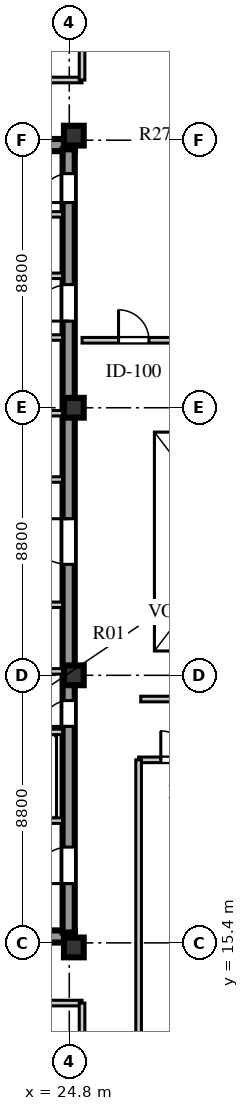
"""IFC4 building model, lengths in metres.
Left out: names, types, materials, properties, quantities, classifications, styles, units other than length and angle.
Written with IfcOpenShell. Run it as: python <this file> out.ifc"""

import sys

from ifc_helpers import new_model, si_unit, direction, frame, frame_2d, origin, origin_2d, place, context, subcontext, project, spatial, rectangle, extrude, element, fill, save


model = new_model("IFC4")
c1 = context("Model", 3, precision=1e-05, world=origin(), true_north=direction((0.0, 1.0)))
c2 = subcontext(c1, "Body", "Model", "MODEL_VIEW")
j1 = project(units=[si_unit("LENGTHUNIT", "METRE"), si_unit("PLANEANGLEUNIT", "RADIAN")], contexts=[c1])
p1 = place(None, origin())
s1 = spatial("IfcSite", under=j1, at=p1, CompositionType="ELEMENT")
p2 = place(p1, origin())
s2 = spatial("IfcBuilding", under=s1, at=p2, CompositionType="ELEMENT")
p3 = place(p2, frame((0.0, 0.0, 260.9)))
s3 = spatial("IfcBuildingStorey", under=s2, at=p3, CompositionType="ELEMENT", Elevation=260.9)
for number, where, z_axis, x_axis in (
    (1, (15.5, 15.61, 0.0), (0.0, 0.0, 1.0), (1.0, 0.0, 0.0)),
    (2, (15.5, 41.64, 0.0), (0.0, 0.0, 1.0), (1.0, 0.0, 0.0)),
):
    element("IfcWall", number, at=place(p3, frame(where, z_axis=z_axis, x_axis=x_axis)), inside=s3, PredefinedType="SHEAR", context=c2, shape_type="SweptSolid", body=[
        extrude(rectangle(XDim=9.48, YDim=0.4, at=frame_2d((4.74, 0.0))), origin(), (0.0, 0.0, 1.0), 3.66),
    ])
p4 = place(p3, frame((24.78, 15.74, 0.0), z_axis=(0.0, 0.0, 1.0), x_axis=(0.0, 1.0, 0.0)))
e3 = element("IfcWall", 3, at=p4, inside=s3, PredefinedType="SHEAR", context=c2, shape_type="SweptSolid", body=[
    extrude(rectangle(XDim=25.76, YDim=0.4, at=frame_2d((12.88, 0.0))), origin(), (0.0, 0.0, 1.0), 3.66),
])
p5 = place(p4, frame((1.61, 0.0, 0.0)))
e4 = element("IfcOpeningElement", 4, at=p5, cuts=e3, PredefinedType="OPENING", context=c2, shape_type="SweptSolid", body=[
    extrude(rectangle(XDim=1.2, YDim=2.1, at=frame_2d((0.6, 1.05))), frame((0.0, 0.21, 0.0), z_axis=(0.0, -1.0, 0.0), x_axis=(1.0, 0.0, 0.0)), (0.0, 0.0, 1.0), 0.42),
])
p6 = place(p4, frame((6.78, 0.0, 0.0)))
e5 = element("IfcOpeningElement", 5, at=p6, cuts=e3, PredefinedType="OPENING", context=c2, shape_type="SweptSolid", body=[
    extrude(rectangle(XDim=0.85, YDim=2.06, at=frame_2d((0.425, 1.03))), frame((0.0, 0.21, 0.0), z_axis=(0.0, -1.0, 0.0), x_axis=(1.0, 0.0, 0.0)), (0.0, 0.0, 1.0), 0.42),
])
p7 = place(p4, frame((12.11, 0.0, 0.0)))
e6 = element("IfcOpeningElement", 6, at=p7, cuts=e3, PredefinedType="OPENING", context=c2, shape_type="SweptSolid", body=[
    extrude(rectangle(XDim=1.5, YDim=2.12, at=frame_2d((0.75, 1.06))), frame((0.0, 0.21, 0.0), z_axis=(0.0, -1.0, 0.0), x_axis=(1.0, 0.0, 0.0)), (0.0, 0.0, 1.0), 0.42),
])
p8 = place(p4, frame((20.11, 0.0, 0.0)))
e7 = element("IfcOpeningElement", 7, at=p8, cuts=e3, PredefinedType="OPENING", context=c2, shape_type="SweptSolid", body=[
    extrude(rectangle(XDim=1.2, YDim=2.12, at=frame_2d((0.6, 1.06))), frame((0.0, 0.21, 0.0), z_axis=(0.0, -1.0, 0.0), x_axis=(1.0, 0.0, 0.0)), (0.0, 0.0, 1.0), 0.42),
])
p9 = place(p4, frame((24.01, 0.0, 0.0)))
e8 = element("IfcOpeningElement", 8, at=p9, cuts=e3, PredefinedType="OPENING", context=c2, shape_type="SweptSolid", body=[
    extrude(rectangle(XDim=0.95, YDim=2.1, at=frame_2d((0.475, 1.05))), frame((0.0, 0.21, 0.0), z_axis=(0.0, -1.0, 0.0), x_axis=(1.0, 0.0, 0.0)), (0.0, 0.0, 1.0), 0.42),
])
for number, where, z_axis, x_axis in (
    (9, (24.95, 15.25, 0.0), (0.0, 0.0, 1.0), (1.0, 0.0, 0.0)),
    (10, (24.95, 24.2, 0.0), (0.0, 0.0, 1.0), (1.0, 0.0, 0.0)),
    (11, (24.95, 33.0, 0.0), (0.0, 0.0, 1.0), (1.0, 0.0, 0.0)),
    (12, (24.95, 41.95, 0.0), (0.0, 0.0, 1.0), (1.0, 0.0, 0.0)),
):
    element("IfcColumn", number, at=place(p3, frame(where, z_axis=z_axis, x_axis=x_axis)), inside=s3, PredefinedType="COLUMN", context=c2, shape_type="SweptSolid", body=[
        extrude(rectangle(XDim=0.65, YDim=0.65, at=origin_2d()), origin(), (0.0, 0.0, 1.0), 3.66),
    ])
p10 = place(p3, frame((19.64, 19.42, 0.0), z_axis=(0.0, 0.0, 1.0), x_axis=(1.0, 0.0, 0.0)))
e13 = element("IfcWall", 13, at=p10, inside=s3, PredefinedType="SOLIDWALL", context=c2, shape_type="SweptSolid", body=[
    extrude(rectangle(XDim=4.94, YDim=0.18, at=frame_2d((2.47, 0.0))), origin(), (0.0, 0.0, 1.0), 3.66),
])
p11 = place(p10, frame((0.72, 0.0, 0.0)))
e14 = element("IfcOpeningElement", 14, at=p11, cuts=e13, PredefinedType="OPENING", context=c2, shape_type="SweptSolid", body=[
    extrude(rectangle(XDim=1.1, YDim=2.1, at=frame_2d((0.55, 1.05))), frame((0.0, 0.1, 0.0), z_axis=(0.0, -1.0, 0.0), x_axis=(1.0, 0.0, 0.0)), (0.0, 0.0, 1.0), 0.2),
])
p12 = place(p10, frame((3.02, 0.0, 0.0)))
e15 = element("IfcOpeningElement", 15, at=p12, cuts=e13, PredefinedType="OPENING", context=c2, shape_type="SweptSolid", body=[
    extrude(rectangle(XDim=1.1, YDim=2.1, at=frame_2d((0.55, 1.05))), frame((0.0, 0.1, 0.0), z_axis=(0.0, -1.0, 0.0), x_axis=(1.0, 0.0, 0.0)), (0.0, 0.0, 1.0), 0.2),
])
p13 = place(p3, frame((19.64, 22.34, 0.0), z_axis=(0.0, 0.0, 1.0), x_axis=(1.0, 0.0, 0.0)))
e16 = element("IfcWall", 16, at=p13, inside=s3, PredefinedType="SOLIDWALL", context=c2, shape_type="SweptSolid", body=[
    extrude(rectangle(XDim=4.94, YDim=0.18, at=frame_2d((2.47, 0.0))), origin(), (0.0, 0.0, 1.0), 3.66),
])
p14 = place(p3, frame((15.9, 26.52, 0.0), z_axis=(0.0, 0.0, 1.0), x_axis=(1.0, 0.0, 0.0)))
e17 = element("IfcWall", 17, at=p14, inside=s3, PredefinedType="SOLIDWALL", context=c2, shape_type="SweptSolid", body=[
    extrude(rectangle(XDim=8.68, YDim=0.18, at=frame_2d((4.34, 0.0))), origin(), (0.0, 0.0, 1.0), 3.66),
])
p15 = place(p14, frame((2.5, 0.0, 0.0)))
e18 = element("IfcOpeningElement", 18, at=p15, cuts=e17, PredefinedType="OPENING", context=c2, shape_type="SweptSolid", body=[
    extrude(rectangle(XDim=0.95, YDim=2.1, at=frame_2d((0.475, 1.05))), frame((0.0, 0.1, 0.0), z_axis=(0.0, -1.0, 0.0), x_axis=(1.0, 0.0, 0.0)), (0.0, 0.0, 1.0), 0.2),
])
p16 = place(p14, frame((6.0, 0.0, 0.0)))
e19 = element("IfcOpeningElement", 19, at=p16, cuts=e17, PredefinedType="OPENING", context=c2, shape_type="SweptSolid", body=[
    extrude(rectangle(XDim=0.95, YDim=2.1, at=frame_2d((0.475, 1.05))), frame((0.0, 0.1, 0.0), z_axis=(0.0, -1.0, 0.0), x_axis=(1.0, 0.0, 0.0)), (0.0, 0.0, 1.0), 0.2),
])
p17 = place(p3, frame((15.9, 24.33, 0.0), z_axis=(0.0, 0.0, 1.0), x_axis=(1.0, 0.0, 0.0)))
e20 = element("IfcWall", 20, at=p17, inside=s3, PredefinedType="SOLIDWALL", context=c2, shape_type="SweptSolid", body=[
    extrude(rectangle(XDim=8.68, YDim=0.18, at=frame_2d((4.34, 0.0))), origin(), (0.0, 0.0, 1.0), 3.06),
])
p18 = place(p3, frame((15.9, 30.64, 0.0), z_axis=(0.0, 0.0, 1.0), x_axis=(1.0, 0.0, 0.0)))
e21 = element("IfcWall", 21, at=p18, inside=s3, PredefinedType="SOLIDWALL", context=c2, shape_type="SweptSolid", body=[
    extrude(rectangle(XDim=8.68, YDim=0.18, at=frame_2d((4.34, 0.0))), origin(), (0.0, 0.0, 1.0), 3.66),
])
p19 = place(p18, frame((3.7, 0.0, 0.0)))
e22 = element("IfcOpeningElement", 22, at=p19, cuts=e21, PredefinedType="OPENING", context=c2, shape_type="SweptSolid", body=[
    extrude(rectangle(XDim=0.95, YDim=2.1, at=frame_2d((0.475, 1.05))), frame((0.0, 0.1, 0.0), z_axis=(0.0, -1.0, 0.0), x_axis=(1.0, 0.0, 0.0)), (0.0, 0.0, 1.0), 0.2),
])
p20 = place(p3, frame((15.9, 32.82, 0.0), z_axis=(0.0, 0.0, 1.0), x_axis=(1.0, 0.0, 0.0)))
e23 = element("IfcWall", 23, at=p20, inside=s3, PredefinedType="SOLIDWALL", context=c2, shape_type="SweptSolid", body=[
    extrude(rectangle(XDim=8.68, YDim=0.18, at=frame_2d((4.34, 0.0))), origin(), (0.0, 0.0, 1.0), 3.06),
])
p21 = place(p3, frame((22.02, 35.31, 0.0), z_axis=(0.0, 0.0, 1.0), x_axis=(1.0, 0.0, 0.0)))
e24 = element("IfcWall", 24, at=p21, inside=s3, PredefinedType="SOLIDWALL", context=c2, shape_type="SweptSolid", body=[
    extrude(rectangle(XDim=2.56, YDim=0.18, at=frame_2d((1.28, 0.0))), origin(), (0.0, 0.0, 1.0), 3.66),
])
p22 = place(p21, frame((0.55, 0.0, 0.0)))
e25 = element("IfcOpeningElement", 25, at=p22, cuts=e24, PredefinedType="OPENING", context=c2, shape_type="SweptSolid", body=[
    extrude(rectangle(XDim=1.0, YDim=2.1, at=frame_2d((0.5, 1.05))), frame((0.0, 0.1, 0.0), z_axis=(0.0, -1.0, 0.0), x_axis=(1.0, 0.0, 0.0)), (0.0, 0.0, 1.0), 0.2),
])
p23 = place(p3, frame((19.64, 37.34, 0.0), z_axis=(0.0, 0.0, 1.0), x_axis=(1.0, 0.0, 0.0)))
e26 = element("IfcWall", 26, at=p23, inside=s3, PredefinedType="SOLIDWALL", context=c2, shape_type="SweptSolid", body=[
    extrude(rectangle(XDim=4.94, YDim=0.18, at=frame_2d((2.47, 0.0))), origin(), (0.0, 0.0, 1.0), 3.66),
])
p24 = place(p23, frame((0.45, 0.0, 0.0)))
e27 = element("IfcOpeningElement", 27, at=p24, cuts=e26, PredefinedType="OPENING", context=c2, shape_type="SweptSolid", body=[
    extrude(rectangle(XDim=1.0, YDim=2.1, at=frame_2d((0.5, 1.05))), frame((0.0, 0.1, 0.0), z_axis=(0.0, -1.0, 0.0), x_axis=(1.0, 0.0, 0.0)), (0.0, 0.0, 1.0), 0.2),
])
p25 = place(p23, frame((2.5, 0.0, 0.0)))
e28 = element("IfcOpeningElement", 28, at=p25, cuts=e26, PredefinedType="OPENING", context=c2, shape_type="SweptSolid", body=[
    extrude(rectangle(XDim=1.0, YDim=2.1, at=frame_2d((0.5, 1.05))), frame((0.0, 0.1, 0.0), z_axis=(0.0, -1.0, 0.0), x_axis=(1.0, 0.0, 0.0)), (0.0, 0.0, 1.0), 0.2),
])
p26 = place(p3, frame((19.64, 39.36, 0.0), z_axis=(0.0, 0.0, 1.0), x_axis=(1.0, 0.0, 0.0)))
e29 = element("IfcWall", 29, at=p26, inside=s3, PredefinedType="SOLIDWALL", context=c2, shape_type="SweptSolid", body=[
    extrude(rectangle(XDim=4.94, YDim=0.18, at=frame_2d((2.47, 0.0))), origin(), (0.0, 0.0, 1.0), 3.66),
])
p27 = place(p3, frame((27.08, 21.42, 0.0), z_axis=(0.0, 0.0, 1.0), x_axis=(1.0, 0.0, 0.0)))
e30 = element("IfcWall", 30, at=p27, inside=s3, PredefinedType="SOLIDWALL", context=c2, shape_type="SweptSolid", body=[
    extrude(rectangle(XDim=12.07, YDim=0.185, at=frame_2d((6.035, 0.0))), origin(), (0.0, 0.0, 1.0), 3.31),
])
p28 = place(p27, frame((0.73, 0.0, 0.0)))
e31 = element("IfcOpeningElement", 31, at=p28, cuts=e30, PredefinedType="OPENING", context=c2, shape_type="SweptSolid", body=[
    extrude(rectangle(XDim=0.95, YDim=2.08, at=frame_2d((0.475, 1.04))), frame((0.0, 0.103, 0.0), z_axis=(0.0, -1.0, 0.0), x_axis=(1.0, 0.0, 0.0)), (0.0, 0.0, 1.0), 0.205),
])
p29 = place(p27, frame((4.67, 0.0, 0.0)))
e32 = element("IfcOpeningElement", 32, at=p29, cuts=e30, PredefinedType="OPENING", context=c2, shape_type="SweptSolid", body=[
    extrude(rectangle(XDim=0.95, YDim=2.08, at=frame_2d((0.475, 1.04))), frame((0.0, 0.103, 0.0), z_axis=(0.0, -1.0, 0.0), x_axis=(1.0, 0.0, 0.0)), (0.0, 0.0, 1.0), 0.205),
])
p30 = place(p27, frame((8.67, 0.0, 0.0)))
e33 = element("IfcOpeningElement", 33, at=p30, cuts=e30, PredefinedType="OPENING", context=c2, shape_type="SweptSolid", body=[
    extrude(rectangle(XDim=0.95, YDim=2.08, at=frame_2d((0.475, 1.04))), frame((0.0, 0.103, 0.0), z_axis=(0.0, -1.0, 0.0), x_axis=(1.0, 0.0, 0.0)), (0.0, 0.0, 1.0), 0.205),
])
p31 = place(p3, frame((27.08, 7.88, 0.0), z_axis=(0.0, 0.0, 1.0), x_axis=(0.0, 1.0, 0.0)))
e34 = element("IfcWall", 34, at=p31, inside=s3, PredefinedType="SOLIDWALL", context=c2, shape_type="SweptSolid", body=[
    extrude(rectangle(XDim=13.54, YDim=0.185, at=frame_2d((6.77, 0.0))), origin(), (0.0, 0.0, 1.0), 3.66),
])
p32 = place(p3, frame((27.15, 23.42, 0.0), z_axis=(0.0, 0.0, 1.0), x_axis=(1.0, 0.0, 0.0)))
e35 = element("IfcWall", 35, at=p32, inside=s3, PredefinedType="SOLIDWALL", context=c2, shape_type="SweptSolid", body=[
    extrude(rectangle(XDim=6.0, YDim=0.185, at=frame_2d((3.0, 0.0))), origin(), (0.0, 0.0, 1.0), 3.66),
])
p33 = place(p3, frame((25.22, 35.22, 0.0), z_axis=(0.0, 0.0, 1.0), x_axis=(1.0, 0.0, 0.0)))
e36 = element("IfcWall", 36, at=p33, inside=s3, PredefinedType="SOLIDWALL", context=c2, shape_type="SweptSolid", body=[
    extrude(rectangle(XDim=9.5, YDim=0.185, at=frame_2d((4.75, 0.0))), origin(), (0.0, 0.0, 1.0), 3.66),
])
p34 = place(p33, frame((1.2, 0.0, 0.0)))
e37 = element("IfcOpeningElement", 37, at=p34, cuts=e36, PredefinedType="OPENING", context=c2, shape_type="SweptSolid", body=[
    extrude(rectangle(XDim=1.0, YDim=2.08, at=frame_2d((0.5, 1.04))), frame((0.0, 0.103, 0.0), z_axis=(0.0, -1.0, 0.0), x_axis=(1.0, 0.0, 0.0)), (0.0, 0.0, 1.0), 0.205),
])
p35 = place(p33, frame((6.2, 0.0, 0.0)))
e38 = element("IfcOpeningElement", 38, at=p35, cuts=e36, PredefinedType="OPENING", context=c2, shape_type="SweptSolid", body=[
    extrude(rectangle(XDim=0.9, YDim=2.08, at=frame_2d((0.45, 1.04))), frame((0.0, 0.103, 0.0), z_axis=(0.0, -1.0, 0.0), x_axis=(1.0, 0.0, 0.0)), (0.0, 0.0, 1.0), 0.205),
])
p36 = place(p3, frame((13.4, 13.42, 0.0), z_axis=(0.0, 0.0, 1.0), x_axis=(1.0, 0.0, 0.0)))
e39 = element("IfcWall", 39, at=p36, inside=s3, PredefinedType="SOLIDWALL", context=c2, shape_type="SweptSolid", body=[
    extrude(rectangle(XDim=11.82, YDim=0.185, at=frame_2d((5.91, 0.0))), origin(), (0.0, 0.0, 1.0), 3.66),
])
p37 = place(p36, frame((0.15, 0.0, 0.0)))
e40 = element("IfcOpeningElement", 40, at=p37, cuts=e39, PredefinedType="OPENING", context=c2, shape_type="SweptSolid", body=[
    extrude(rectangle(XDim=0.9, YDim=2.08, at=frame_2d((0.45, 1.04))), frame((0.0, 0.103, 0.0), z_axis=(0.0, -1.0, 0.0), x_axis=(1.0, 0.0, 0.0)), (0.0, 0.0, 1.0), 0.205),
])
p38 = place(p36, frame((6.87, 0.0, 0.0)))
e41 = element("IfcOpeningElement", 41, at=p38, cuts=e39, PredefinedType="OPENING", context=c2, shape_type="SweptSolid", body=[
    extrude(rectangle(XDim=0.9, YDim=2.08, at=frame_2d((0.45, 1.04))), frame((0.0, 0.103, 0.0), z_axis=(0.0, -1.0, 0.0), x_axis=(1.0, 0.0, 0.0)), (0.0, 0.0, 1.0), 0.205),
])
p39 = place(p3, frame((25.22, 7.88, 0.0), z_axis=(0.0, 0.0, 1.0), x_axis=(0.0, 1.0, 0.0)))
e42 = element("IfcWall", 42, at=p39, inside=s3, PredefinedType="SOLIDWALL", context=c2, shape_type="SweptSolid", body=[
    extrude(rectangle(XDim=5.54, YDim=0.185, at=frame_2d((2.77, 0.0))), origin(), (0.0, 0.0, 1.0), 3.21),
])
p40 = place(p3, frame((13.4, 43.78, 0.0), z_axis=(0.0, 0.0, 1.0), x_axis=(1.0, 0.0, 0.0)))
e43 = element("IfcWall", 43, at=p40, inside=s3, PredefinedType="SOLIDWALL", context=c2, shape_type="SweptSolid", body=[
    extrude(rectangle(XDim=11.82, YDim=0.185, at=frame_2d((5.91, 0.0))), origin(), (0.0, 0.0, 1.0), 3.66),
])
p41 = place(p40, frame((3.2, 0.0, 0.0)))
e44 = element("IfcOpeningElement", 44, at=p41, cuts=e43, PredefinedType="OPENING", context=c2, shape_type="SweptSolid", body=[
    extrude(rectangle(XDim=0.95, YDim=2.08, at=frame_2d((0.475, 1.04))), frame((0.0, 0.103, 0.0), z_axis=(0.0, -1.0, 0.0), x_axis=(1.0, 0.0, 0.0)), (0.0, 0.0, 1.0), 0.205),
])
p42 = place(p3, frame((25.22, 43.78, 0.0), z_axis=(0.0, 0.0, 1.0), x_axis=(0.0, 1.0, 0.0)))
e45 = element("IfcWall", 45, at=p42, inside=s3, PredefinedType="SOLIDWALL", context=c2, shape_type="SweptSolid", body=[
    extrude(rectangle(XDim=5.54, YDim=0.185, at=frame_2d((2.77, 0.0))), origin(), (0.0, 0.0, 1.0), 3.21),
])
p43 = place(p5, frame((1.2, 0.0, 0.0), z_axis=(0.0, 0.0, 1.0), x_axis=(-1.0, 0.0, 0.0)))
e46 = element("IfcDoor", 46, at=p43, inside=s3, OperationType="SINGLE_SWING_RIGHT", PredefinedType="DOOR", context=c2, shape_type="SweptSolid", body=[
    extrude(rectangle(XDim=1.2, YDim=2.1, at=frame_2d((0.6, 1.05))), frame((0.0, 0.025, 0.0), z_axis=(0.0, -1.0, 0.0), x_axis=(1.0, 0.0, 0.0)), (0.0, 0.0, 1.0), 0.05),
])
fill(e4, e46)
p44 = place(p6, frame((0.85, 0.0, 0.0), z_axis=(0.0, 0.0, 1.0), x_axis=(-1.0, 0.0, 0.0)))
e47 = element("IfcDoor", 47, at=p44, inside=s3, OperationType="SINGLE_SWING_RIGHT", PredefinedType="DOOR", context=c2, shape_type="SweptSolid", body=[
    extrude(rectangle(XDim=0.85, YDim=2.06, at=frame_2d((0.425, 1.03))), frame((0.0, 0.025, 0.0), z_axis=(0.0, -1.0, 0.0), x_axis=(1.0, 0.0, 0.0)), (0.0, 0.0, 1.0), 0.05),
])
fill(e5, e47)
p45 = place(p7, frame((1.5, 0.0, 0.0), z_axis=(0.0, 0.0, 1.0), x_axis=(-1.0, 0.0, 0.0)))
e48 = element("IfcDoor", 48, at=p45, inside=s3, OperationType="SINGLE_SWING_LEFT", PredefinedType="DOOR", context=c2, shape_type="SweptSolid", body=[
    extrude(rectangle(XDim=1.5, YDim=2.12, at=frame_2d((0.75, 1.06))), frame((0.0, 0.025, 0.0), z_axis=(0.0, -1.0, 0.0), x_axis=(1.0, 0.0, 0.0)), (0.0, 0.0, 1.0), 0.05),
])
fill(e6, e48)
p46 = place(p8, frame((1.2, 0.0, 0.0), z_axis=(0.0, 0.0, 1.0), x_axis=(-1.0, 0.0, 0.0)))
e49 = element("IfcDoor", 49, at=p46, inside=s3, OperationType="SINGLE_SWING_RIGHT", PredefinedType="DOOR", context=c2, shape_type="SweptSolid", body=[
    extrude(rectangle(XDim=1.2, YDim=2.12, at=frame_2d((0.6, 1.06))), frame((0.0, 0.025, 0.0), z_axis=(0.0, -1.0, 0.0), x_axis=(1.0, 0.0, 0.0)), (0.0, 0.0, 1.0), 0.05),
])
fill(e7, e49)
p47 = place(p9, frame((0.95, 0.0, 0.0), z_axis=(0.0, 0.0, 1.0), x_axis=(-1.0, 0.0, 0.0)))
e50 = element("IfcDoor", 50, at=p47, inside=s3, OperationType="SINGLE_SWING_RIGHT", PredefinedType="DOOR", context=c2, shape_type="SweptSolid", body=[
    extrude(rectangle(XDim=0.95, YDim=2.1, at=frame_2d((0.475, 1.05))), frame((0.0, 0.025, 0.0), z_axis=(0.0, -1.0, 0.0), x_axis=(1.0, 0.0, 0.0)), (0.0, 0.0, 1.0), 0.05),
])
fill(e8, e50)
p48 = place(p28, frame((0.95, 0.0, 0.0), z_axis=(0.0, 0.0, 1.0), x_axis=(-1.0, 0.0, 0.0)))
e51 = element("IfcDoor", 51, at=p48, inside=s3, OperationType="SINGLE_SWING_RIGHT", PredefinedType="DOOR", context=c2, shape_type="SweptSolid", body=[
    extrude(rectangle(XDim=0.95, YDim=2.08, at=frame_2d((0.475, 1.04))), frame((0.0, 0.025, 0.0), z_axis=(0.0, -1.0, 0.0), x_axis=(1.0, 0.0, 0.0)), (0.0, 0.0, 1.0), 0.05),
])
fill(e31, e51)
p49 = place(p34, origin())
e52 = element("IfcDoor", 52, at=p49, inside=s3, OperationType="SINGLE_SWING_LEFT", PredefinedType="DOOR", context=c2, shape_type="SweptSolid", body=[
    extrude(rectangle(XDim=1.0, YDim=2.08, at=frame_2d((0.5, 1.04))), frame((0.0, 0.025, 0.0), z_axis=(0.0, -1.0, 0.0), x_axis=(1.0, 0.0, 0.0)), (0.0, 0.0, 1.0), 0.05),
])
fill(e37, e52)
save(model, sys.argv[1])
